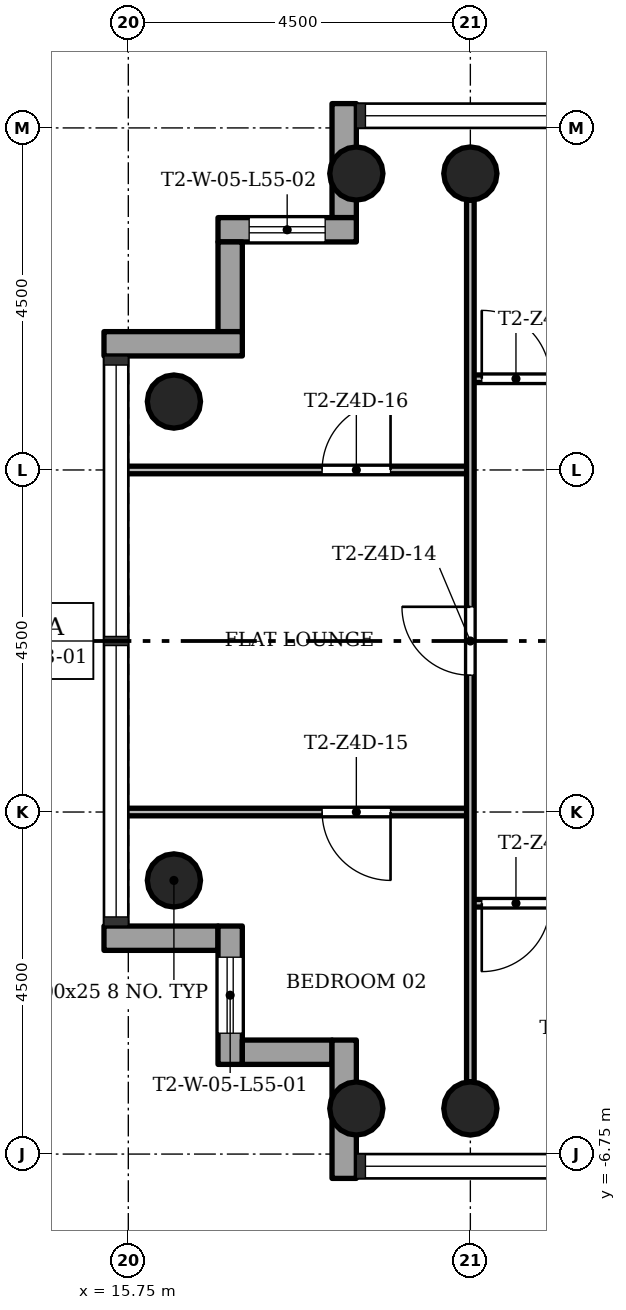
"""IFC4 building model, lengths in metres.
Left out: names, types, materials, properties, quantities, classifications, styles, units other than length and angle.
Written with IfcOpenShell. Run it as: python <this file> out.ifc"""

import sys

from ifc_helpers import new_model, si_unit, direction, frame, frame_2d, origin, origin_2d, place, context, subcontext, project, spatial, rectangle, hollow_circle, extrude, element, fill, save


model = new_model("IFC4")
c1 = context("Model", 3, precision=1e-05, world=origin(), true_north=direction((0.0, 1.0)))
c2 = subcontext(c1, "Body", "Model", "MODEL_VIEW")
j1 = project(units=[si_unit("LENGTHUNIT", "METRE"), si_unit("PLANEANGLEUNIT", "RADIAN")], contexts=[c1])
p1 = place(None, origin())
s1 = spatial("IfcSite", under=j1, at=p1, CompositionType="ELEMENT")
p2 = place(p1, origin())
s2 = spatial("IfcBuilding", under=s1, at=p2, CompositionType="ELEMENT")
p3 = place(p2, frame((0.0, 0.0, 199.4)))
s3 = spatial("IfcBuildingStorey", under=s2, at=p3, CompositionType="ELEMENT", Elevation=199.4)
for number, where, z_axis, x_axis in (
    (1, (20.25, 6.15, 0.0), (0.0, 0.0, 1.0), (1.0, 0.0, 0.0)),
    (2, (20.25, -6.15, 0.0), (0.0, 0.0, 1.0), (1.0, 0.0, 0.0)),
    (3, (18.75, 6.15, 0.0), (0.0, 0.0, 1.0), (1.0, 0.0, 0.0)),
    (4, (18.75, -6.15, 0.0), (0.0, 0.0, 1.0), (1.0, 0.0, 0.0)),
    (5, (16.35, 3.15, 0.0), (0.0, 0.0, 1.0), (1.0, 0.0, 0.0)),
    (6, (16.35, -3.15, 0.0), (0.0, 0.0, 1.0), (1.0, 0.0, 0.0)),
):
    element("IfcColumn", number, at=place(p3, frame(where, z_axis=z_axis, x_axis=x_axis)), inside=s3, PredefinedType="COLUMN", context=c2, shape_type="SweptSolid", body=[
        extrude(hollow_circle(Radius=0.35, WallThickness=0.025, at=origin_2d()), origin(), (0.0, 0.0, 1.0), 3.4),
    ])
p4 = place(p3, frame((18.59, 7.07, -0.3), z_axis=(0.0, 0.0, 1.0), x_axis=(0.0, -1.0, 0.0)))
e7 = element("IfcWall", 7, at=p4, inside=s3, PredefinedType="STANDARD", context=c2, shape_type="SweptSolid", body=[
    extrude(rectangle(XDim=1.5, YDim=0.32, at=frame_2d((0.75, 0.0))), origin(), (0.0, 0.0, 1.0), 3.4),
])
p5 = place(p3, frame((18.75, 5.41, -0.3), z_axis=(0.0, 0.0, 1.0), x_axis=(-1.0, 0.0, 0.0)))
e8 = element("IfcWall", 8, at=p5, inside=s3, PredefinedType="STANDARD", context=c2, shape_type="SweptSolid", body=[
    extrude(rectangle(XDim=1.82, YDim=0.32, at=frame_2d((0.91, 0.0))), origin(), (0.0, 0.0, 1.0), 3.4),
])
p6 = place(p5, frame((0.41, 0.0, 1.2)))
e9 = element("IfcOpeningElement", 9, at=p6, cuts=e8, PredefinedType="OPENING", context=c2, shape_type="SweptSolid", body=[
    extrude(rectangle(XDim=1.0, YDim=1.5, at=frame_2d((0.5, 0.75))), frame((0.0, 0.17, 0.0), z_axis=(0.0, -1.0, 0.0), x_axis=(1.0, 0.0, 0.0)), (0.0, 0.0, 1.0), 0.34),
])
p7 = place(p3, frame((17.09, 5.25, -0.3), z_axis=(0.0, 0.0, 1.0), x_axis=(0.0, -1.0, 0.0)))
e10 = element("IfcWall", 10, at=p7, inside=s3, PredefinedType="STANDARD", context=c2, shape_type="SweptSolid", body=[
    extrude(rectangle(XDim=1.18, YDim=0.32, at=frame_2d((0.59, 0.0))), origin(), (0.0, 0.0, 1.0), 3.4),
])
p8 = place(p3, frame((17.25, 3.91, -0.3), z_axis=(0.0, 0.0, 1.0), x_axis=(-1.0, 0.0, 0.0)))
e11 = element("IfcWall", 11, at=p8, inside=s3, PredefinedType="STANDARD", context=c2, shape_type="SweptSolid", body=[
    extrude(rectangle(XDim=1.82, YDim=0.32, at=frame_2d((0.91, 0.0))), origin(), (0.0, 0.0, 1.0), 3.4),
])
p9 = place(p3, frame((15.43, -3.91, -0.3), z_axis=(0.0, 0.0, 1.0), x_axis=(1.0, 0.0, 0.0)))
e12 = element("IfcWall", 12, at=p9, inside=s3, PredefinedType="STANDARD", context=c2, shape_type="SweptSolid", body=[
    extrude(rectangle(XDim=1.5, YDim=0.32, at=frame_2d((0.75, 0.0))), origin(), (0.0, 0.0, 1.0), 3.4),
])
p10 = place(p3, frame((17.09, -3.75, -0.3), z_axis=(0.0, 0.0, 1.0), x_axis=(0.0, -1.0, 0.0)))
e13 = element("IfcWall", 13, at=p10, inside=s3, PredefinedType="STANDARD", context=c2, shape_type="SweptSolid", body=[
    extrude(rectangle(XDim=1.82, YDim=0.32, at=frame_2d((0.91, 0.0))), origin(), (0.0, 0.0, 1.0), 3.4),
])
p11 = place(p10, frame((0.41, 0.0, 1.2)))
e14 = element("IfcOpeningElement", 14, at=p11, cuts=e13, PredefinedType="OPENING", context=c2, shape_type="SweptSolid", body=[
    extrude(rectangle(XDim=1.0, YDim=1.5, at=frame_2d((0.5, 0.75))), frame((0.0, 0.17, 0.0), z_axis=(0.0, -1.0, 0.0), x_axis=(1.0, 0.0, 0.0)), (0.0, 0.0, 1.0), 0.34),
])
p12 = place(p3, frame((17.25, -5.41, -0.3), z_axis=(0.0, 0.0, 1.0), x_axis=(1.0, 0.0, 0.0)))
e15 = element("IfcWall", 15, at=p12, inside=s3, PredefinedType="STANDARD", context=c2, shape_type="SweptSolid", body=[
    extrude(rectangle(XDim=1.18, YDim=0.32, at=frame_2d((0.59, 0.0))), origin(), (0.0, 0.0, 1.0), 3.4),
])
p13 = place(p3, frame((18.59, -5.25, -0.3), z_axis=(0.0, 0.0, 1.0), x_axis=(0.0, -1.0, 0.0)))
e16 = element("IfcWall", 16, at=p13, inside=s3, PredefinedType="STANDARD", context=c2, shape_type="SweptSolid", body=[
    extrude(rectangle(XDim=1.82, YDim=0.32, at=frame_2d((0.91, 0.0))), origin(), (0.0, 0.0, 1.0), 3.4),
])
p14 = place(p3, frame((24.75, -3.45, 0.0), z_axis=(0.0, 0.0, 1.0), x_axis=(-1.0, 0.0, 0.0)))
e17 = element("IfcWall", 17, at=p14, inside=s3, PredefinedType="PARTITIONING", context=c2, shape_type="SweptSolid", body=[
    extrude(rectangle(XDim=4.5, YDim=0.1, at=frame_2d((2.25, 0.0))), origin(), (0.0, 0.0, 1.0), 3.0),
])
p15 = place(p14, frame((3.45, 0.0, 0.0)))
e18 = element("IfcOpeningElement", 18, at=p15, cuts=e17, PredefinedType="OPENING", context=c2, shape_type="SweptSolid", body=[
    extrude(rectangle(XDim=0.9, YDim=2.1, at=frame_2d((0.45, 1.05))), frame((0.0, 0.06, 0.0), z_axis=(0.0, -1.0, 0.0), x_axis=(1.0, 0.0, 0.0)), (0.0, 0.0, 1.0), 0.12),
])
p16 = place(p3, frame((20.25, -2.25, 0.0), z_axis=(0.0, 0.0, 1.0), x_axis=(-1.0, 0.0, 0.0)))
e19 = element("IfcWall", 19, at=p16, inside=s3, PredefinedType="PARTITIONING", context=c2, shape_type="SweptSolid", body=[
    extrude(rectangle(XDim=4.6, YDim=0.1, at=frame_2d((2.3, 0.0))), origin(), (0.0, 0.0, 1.0), 3.0),
])
p17 = place(p16, frame((1.05, 0.0, 0.0)))
e20 = element("IfcOpeningElement", 20, at=p17, cuts=e19, PredefinedType="OPENING", context=c2, shape_type="SweptSolid", body=[
    extrude(rectangle(XDim=0.9, YDim=2.1, at=frame_2d((0.45, 1.05))), frame((0.0, 0.06, 0.0), z_axis=(0.0, -1.0, 0.0), x_axis=(1.0, 0.0, 0.0)), (0.0, 0.0, 1.0), 0.12),
])
p18 = place(p3, frame((20.25, 2.25, 0.0), z_axis=(0.0, 0.0, 1.0), x_axis=(-1.0, 0.0, 0.0)))
e21 = element("IfcWall", 21, at=p18, inside=s3, PredefinedType="PARTITIONING", context=c2, shape_type="SweptSolid", body=[
    extrude(rectangle(XDim=4.6, YDim=0.1, at=frame_2d((2.3, 0.0))), origin(), (0.0, 0.0, 1.0), 3.0),
])
p19 = place(p18, frame((1.05, 0.0, 0.0)))
e22 = element("IfcOpeningElement", 22, at=p19, cuts=e21, PredefinedType="OPENING", context=c2, shape_type="SweptSolid", body=[
    extrude(rectangle(XDim=0.9, YDim=2.1, at=frame_2d((0.45, 1.05))), frame((0.0, 0.06, 0.0), z_axis=(0.0, -1.0, 0.0), x_axis=(1.0, 0.0, 0.0)), (0.0, 0.0, 1.0), 0.12),
])
p20 = place(p3, frame((24.75, 3.45, 0.0), z_axis=(0.0, 0.0, 1.0), x_axis=(-1.0, 0.0, 0.0)))
e23 = element("IfcWall", 23, at=p20, inside=s3, PredefinedType="PARTITIONING", context=c2, shape_type="SweptSolid", body=[
    extrude(rectangle(XDim=4.5, YDim=0.1, at=frame_2d((2.25, 0.0))), origin(), (0.0, 0.0, 1.0), 3.0),
])
p21 = place(p20, frame((3.45, 0.0, 0.0)))
e24 = element("IfcOpeningElement", 24, at=p21, cuts=e23, PredefinedType="OPENING", context=c2, shape_type="SweptSolid", body=[
    extrude(rectangle(XDim=0.9, YDim=2.1, at=frame_2d((0.45, 1.05))), frame((0.0, 0.06, 0.0), z_axis=(0.0, -1.0, 0.0), x_axis=(1.0, 0.0, 0.0)), (0.0, 0.0, 1.0), 0.12),
])
p22 = place(p3, frame((20.25, -5.8, 0.0), z_axis=(0.0, 0.0, 1.0), x_axis=(0.0, 1.0, 0.0)))
e25 = element("IfcWall", 25, at=p22, inside=s3, PredefinedType="PARTITIONING", context=c2, shape_type="SweptSolid", body=[
    extrude(rectangle(XDim=11.6, YDim=0.1, at=frame_2d((5.8, 0.0))), origin(), (0.0, 0.0, 1.0), 3.0),
])
p23 = place(p22, frame((5.35, 0.0, 0.0)))
e26 = element("IfcOpeningElement", 26, at=p23, cuts=e25, PredefinedType="OPENING", context=c2, shape_type="SweptSolid", body=[
    extrude(rectangle(XDim=0.9, YDim=2.1, at=frame_2d((0.45, 1.05))), frame((0.0, 0.06, 0.0), z_axis=(0.0, -1.0, 0.0), x_axis=(1.0, 0.0, 0.0)), (0.0, 0.0, 1.0), 0.12),
])
p24 = place(p15, origin())
e27 = element("IfcDoor", 27, at=p24, inside=s3, OperationType="SINGLE_SWING_LEFT", PredefinedType="DOOR", context=c2, shape_type="SweptSolid", body=[
    extrude(rectangle(XDim=0.9, YDim=2.1, at=frame_2d((0.45, 1.05))), frame((0.0, 0.025, 0.0), z_axis=(0.0, -1.0, 0.0), x_axis=(1.0, 0.0, 0.0)), (0.0, 0.0, 1.0), 0.05),
])
fill(e18, e27)
p25 = place(p21, origin())
e28 = element("IfcDoor", 28, at=p25, inside=s3, OperationType="SINGLE_SWING_RIGHT", PredefinedType="DOOR", context=c2, shape_type="SweptSolid", body=[
    extrude(rectangle(XDim=0.9, YDim=2.1, at=frame_2d((0.45, 1.05))), frame((0.0, 0.025, 0.0), z_axis=(0.0, -1.0, 0.0), x_axis=(1.0, 0.0, 0.0)), (0.0, 0.0, 1.0), 0.05),
])
fill(e24, e28)
p26 = place(p23, origin())
e29 = element("IfcDoor", 29, at=p26, inside=s3, OperationType="SINGLE_SWING_LEFT", PredefinedType="DOOR", context=c2, shape_type="SweptSolid", body=[
    extrude(rectangle(XDim=0.9, YDim=2.1, at=frame_2d((0.45, 1.05))), frame((0.0, 0.025, 0.0), z_axis=(0.0, -1.0, 0.0), x_axis=(1.0, 0.0, 0.0)), (0.0, 0.0, 1.0), 0.05),
])
fill(e26, e29)
p27 = place(p17, origin())
e30 = element("IfcDoor", 30, at=p27, inside=s3, OperationType="SINGLE_SWING_RIGHT", PredefinedType="DOOR", context=c2, shape_type="SweptSolid", body=[
    extrude(rectangle(XDim=0.9, YDim=2.1, at=frame_2d((0.45, 1.05))), frame((0.0, 0.025, 0.0), z_axis=(0.0, -1.0, 0.0), x_axis=(1.0, 0.0, 0.0)), (0.0, 0.0, 1.0), 0.05),
])
fill(e20, e30)
p28 = place(p19, origin())
e31 = element("IfcDoor", 31, at=p28, inside=s3, OperationType="SINGLE_SWING_LEFT", PredefinedType="DOOR", context=c2, shape_type="SweptSolid", body=[
    extrude(rectangle(XDim=0.9, YDim=2.1, at=frame_2d((0.45, 1.05))), frame((0.0, 0.025, 0.0), z_axis=(0.0, -1.0, 0.0), x_axis=(1.0, 0.0, 0.0)), (0.0, 0.0, 1.0), 0.05),
])
fill(e22, e31)
p29 = place(p11, origin())
e32 = element("IfcWindow", 32, at=p29, inside=s3, PartitioningType="SINGLE_PANEL", PredefinedType="WINDOW", context=c2, shape_type="SweptSolid", body=[
    extrude(rectangle(XDim=1.0, YDim=1.5, at=frame_2d((0.5, 0.75))), frame((0.0, 0.03, 0.0), z_axis=(0.0, -1.0, 0.0), x_axis=(1.0, 0.0, 0.0)), (0.0, 0.0, 1.0), 0.06),
])
fill(e14, e32)
p30 = place(p6, origin())
e33 = element("IfcWindow", 33, at=p30, inside=s3, PartitioningType="SINGLE_PANEL", PredefinedType="WINDOW", context=c2, shape_type="SweptSolid", body=[
    extrude(rectangle(XDim=1.0, YDim=1.5, at=frame_2d((0.5, 0.75))), frame((0.0, 0.03, 0.0), z_axis=(0.0, -1.0, 0.0), x_axis=(1.0, 0.0, 0.0)), (0.0, 0.0, 1.0), 0.06),
])
fill(e9, e33)
save(model, sys.argv[1])
